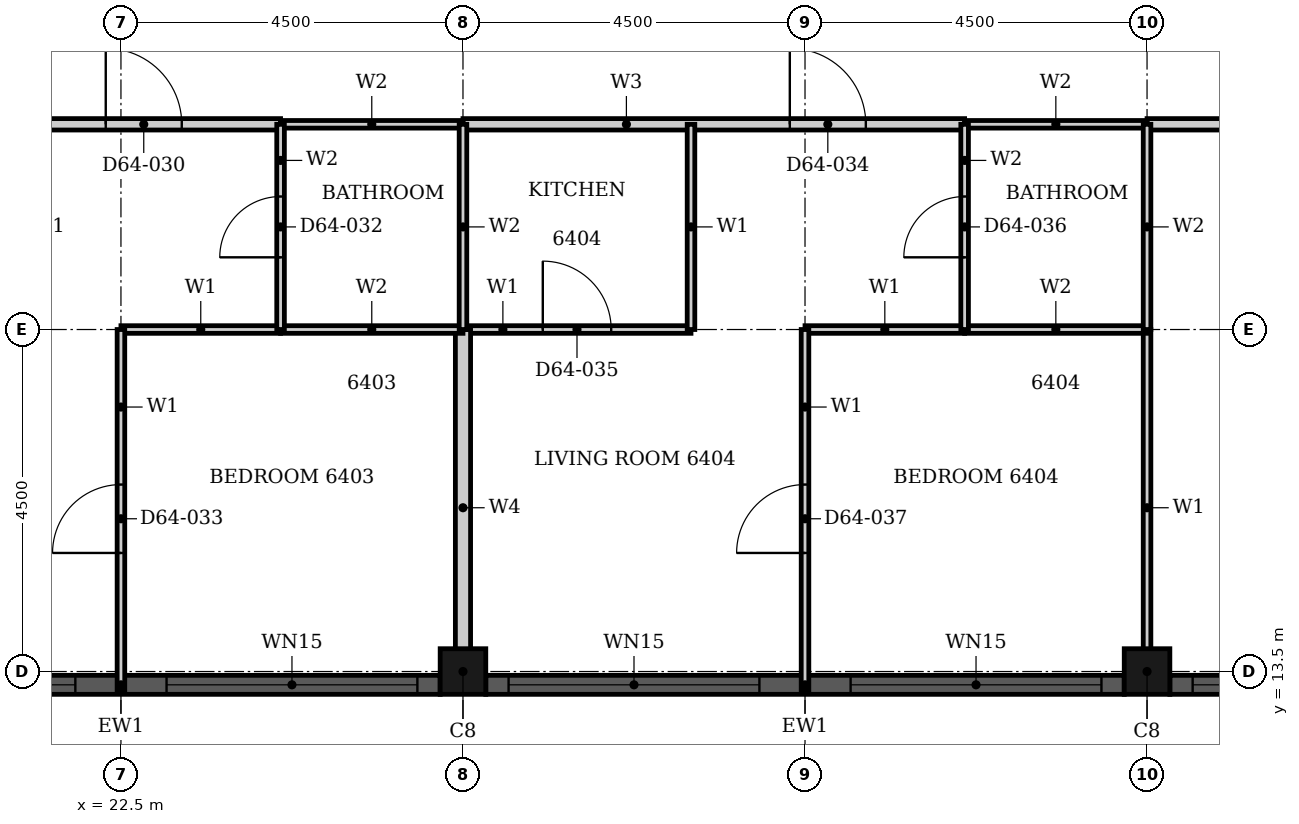
"""IFC4 building model, lengths in metres.
Left out: names, types, materials, properties, quantities, classifications, styles, units other than length and angle.
Written with IfcOpenShell. Run it as: python <this file> out.ifc"""

import sys

from ifc_helpers import new_model, si_unit, direction, frame, frame_2d, origin, origin_2d, place, context, subcontext, project, spatial, rectangle, hollow_rectangle, extrude, element, fill, save


model = new_model("IFC4")
c1 = context("Model", 3, precision=1e-05, world=origin(), true_north=direction((0.0, 1.0)))
c2 = subcontext(c1, "Body", "Model", "MODEL_VIEW")
j1 = project(units=[si_unit("LENGTHUNIT", "METRE"), si_unit("PLANEANGLEUNIT", "RADIAN")], contexts=[c1])
p1 = place(None, origin())
s1 = spatial("IfcSite", under=j1, at=p1, CompositionType="ELEMENT")
p2 = place(p1, origin())
s2 = spatial("IfcBuilding", under=s1, at=p2, CompositionType="ELEMENT")
p3 = place(p2, frame((0.0, 0.0, 252.7)))
s3 = spatial("IfcBuildingStorey", under=s2, at=p3, CompositionType="ELEMENT", Elevation=252.7)
for number, where, z_axis, x_axis in (
    (1, (27.0, 13.5, 0.0), (0.0, 0.0, 1.0), (1.0, 0.0, 0.0)),
    (2, (36.0, 13.5, 0.0), (0.0, 0.0, 1.0), (1.0, 0.0, 0.0)),
):
    element("IfcColumn", number, at=place(p3, frame(where, z_axis=z_axis, x_axis=x_axis)), inside=s3, PredefinedType="COLUMN", context=c2, shape_type="SweptSolid", body=[
        extrude(hollow_rectangle(XDim=0.6, YDim=0.6, WallThickness=0.02, at=origin_2d()), origin(), (0.0, 0.0, 1.0), 3.7),
    ])
p4 = place(p3, frame((18.3, 13.325, 0.0), z_axis=(0.0, 0.0, 1.0), x_axis=(1.0, 0.0, 0.0)))
e3 = element("IfcWall", 3, at=p4, inside=s3, PredefinedType="SOLIDWALL", context=c2, shape_type="SweptSolid", body=[
    extrude(rectangle(XDim=8.4, YDim=0.25, at=frame_2d((4.2, 0.0))), origin(), (0.0, 0.0, 1.0), 3.7),
])
p5 = place(p4, frame((0.3, 0.0, 0.45)))
e4 = element("IfcOpeningElement", 4, at=p5, cuts=e3, PredefinedType="OPENING", context=c2, shape_type="SweptSolid", body=[
    extrude(rectangle(XDim=3.3, YDim=2.3, at=frame_2d((1.65, 1.15))), frame((0.0, 0.135, 0.0), z_axis=(0.0, -1.0, 0.0), x_axis=(1.0, 0.0, 0.0)), (0.0, 0.0, 1.0), 0.27),
])
p6 = place(p4, frame((4.8, 0.0, 0.45)))
e5 = element("IfcOpeningElement", 5, at=p6, cuts=e3, PredefinedType="OPENING", context=c2, shape_type="SweptSolid", body=[
    extrude(rectangle(XDim=3.3, YDim=2.3, at=frame_2d((1.65, 1.15))), frame((0.0, 0.135, 0.0), z_axis=(0.0, -1.0, 0.0), x_axis=(1.0, 0.0, 0.0)), (0.0, 0.0, 1.0), 0.27),
])
p7 = place(p3, frame((27.3, 13.325, 0.0), z_axis=(0.0, 0.0, 1.0), x_axis=(1.0, 0.0, 0.0)))
e6 = element("IfcWall", 6, at=p7, inside=s3, PredefinedType="SOLIDWALL", context=c2, shape_type="SweptSolid", body=[
    extrude(rectangle(XDim=8.4, YDim=0.25, at=frame_2d((4.2, 0.0))), origin(), (0.0, 0.0, 1.0), 3.7),
])
p8 = place(p7, frame((0.3, 0.0, 0.45)))
e7 = element("IfcOpeningElement", 7, at=p8, cuts=e6, PredefinedType="OPENING", context=c2, shape_type="SweptSolid", body=[
    extrude(rectangle(XDim=3.3, YDim=2.3, at=frame_2d((1.65, 1.15))), frame((0.0, 0.135, 0.0), z_axis=(0.0, -1.0, 0.0), x_axis=(1.0, 0.0, 0.0)), (0.0, 0.0, 1.0), 0.27),
])
p9 = place(p7, frame((4.8, 0.0, 0.45)))
e8 = element("IfcOpeningElement", 8, at=p9, cuts=e6, PredefinedType="OPENING", context=c2, shape_type="SweptSolid", body=[
    extrude(rectangle(XDim=3.3, YDim=2.3, at=frame_2d((1.65, 1.15))), frame((0.0, 0.135, 0.0), z_axis=(0.0, -1.0, 0.0), x_axis=(1.0, 0.0, 0.0)), (0.0, 0.0, 1.0), 0.27),
])
p10 = place(p3, frame((36.3, 13.325, 0.0), z_axis=(0.0, 0.0, 1.0), x_axis=(1.0, 0.0, 0.0)))
e9 = element("IfcWall", 9, at=p10, inside=s3, PredefinedType="SOLIDWALL", context=c2, shape_type="SweptSolid", body=[
    extrude(rectangle(XDim=8.4, YDim=0.25, at=frame_2d((4.2, 0.0))), origin(), (0.0, 0.0, 1.0), 3.7),
])
p11 = place(p10, frame((0.3, 0.0, 0.45)))
e10 = element("IfcOpeningElement", 10, at=p11, cuts=e9, PredefinedType="OPENING", context=c2, shape_type="SweptSolid", body=[
    extrude(rectangle(XDim=3.3, YDim=2.3, at=frame_2d((1.65, 1.15))), frame((0.0, 0.135, 0.0), z_axis=(0.0, -1.0, 0.0), x_axis=(1.0, 0.0, 0.0)), (0.0, 0.0, 1.0), 0.27),
])
p12 = place(p10, frame((4.8, 0.0, 0.45)))
e11 = element("IfcOpeningElement", 11, at=p12, cuts=e9, PredefinedType="OPENING", context=c2, shape_type="SweptSolid", body=[
    extrude(rectangle(XDim=3.3, YDim=2.3, at=frame_2d((1.65, 1.15))), frame((0.0, 0.135, 0.0), z_axis=(0.0, -1.0, 0.0), x_axis=(1.0, 0.0, 0.0)), (0.0, 0.0, 1.0), 0.27),
])
p13 = place(p3, frame((18.0, 20.7, 0.0), z_axis=(0.0, 0.0, 1.0), x_axis=(1.0, 0.0, 0.0)))
e12 = element("IfcWall", 12, at=p13, inside=s3, PredefinedType="PARTITIONING", context=c2, shape_type="SweptSolid", body=[
    extrude(rectangle(XDim=6.6, YDim=0.15, at=frame_2d((3.3, 0.0))), origin(), (0.0, 0.0, 1.0), 3.4),
])
p14 = place(p13, frame((4.3, 0.0, 0.0)))
e13 = element("IfcOpeningElement", 13, at=p14, cuts=e12, PredefinedType="OPENING", context=c2, shape_type="SweptSolid", body=[
    extrude(rectangle(XDim=1.0, YDim=2.2, at=frame_2d((0.5, 1.1))), frame((0.0, 0.085, 0.0), z_axis=(0.0, -1.0, 0.0), x_axis=(1.0, 0.0, 0.0)), (0.0, 0.0, 1.0), 0.17),
])
p15 = place(p3, frame((27.0, 20.7, 0.0), z_axis=(0.0, 0.0, 1.0), x_axis=(1.0, 0.0, 0.0)))
e14 = element("IfcWall", 14, at=p15, inside=s3, PredefinedType="PARTITIONING", context=c2, shape_type="SweptSolid", body=[
    extrude(rectangle(XDim=6.6, YDim=0.15, at=frame_2d((3.3, 0.0))), origin(), (0.0, 0.0, 1.0), 3.4),
])
p16 = place(p15, frame((4.3, 0.0, 0.0)))
e15 = element("IfcOpeningElement", 15, at=p16, cuts=e14, PredefinedType="OPENING", context=c2, shape_type="SweptSolid", body=[
    extrude(rectangle(XDim=1.0, YDim=2.2, at=frame_2d((0.5, 1.1))), frame((0.0, 0.085, 0.0), z_axis=(0.0, -1.0, 0.0), x_axis=(1.0, 0.0, 0.0)), (0.0, 0.0, 1.0), 0.17),
])
p17 = place(p3, frame((36.0, 20.7, 0.0), z_axis=(0.0, 0.0, 1.0), x_axis=(1.0, 0.0, 0.0)))
e16 = element("IfcWall", 16, at=p17, inside=s3, PredefinedType="PARTITIONING", context=c2, shape_type="SweptSolid", body=[
    extrude(rectangle(XDim=13.55, YDim=0.15, at=frame_2d((6.775, 0.0))), origin(), (0.0, 0.0, 1.0), 3.4),
])
p18 = place(p17, frame((4.0, 0.0, 0.0)))
e17 = element("IfcOpeningElement", 17, at=p18, cuts=e16, PredefinedType="OPENING", context=c2, shape_type="SweptSolid", body=[
    extrude(rectangle(XDim=1.0, YDim=2.1, at=frame_2d((0.5, 1.05))), frame((0.0, 0.085, 0.0), z_axis=(0.0, -1.0, 0.0), x_axis=(1.0, 0.0, 0.0)), (0.0, 0.0, 1.0), 0.17),
])
for number, where, z_axis, x_axis in (
    (18, (22.5, 18.0, 0.0), (0.0, 0.0, 1.0), (1.0, 0.0, 0.0)),
    (19, (31.5, 18.0, 0.0), (0.0, 0.0, 1.0), (1.0, 0.0, 0.0)),
):
    element("IfcWall", number, at=place(p3, frame(where, z_axis=z_axis, x_axis=x_axis)), inside=s3, PredefinedType="PARTITIONING", context=c2, shape_type="SweptSolid", body=[
        extrude(rectangle(XDim=2.1, YDim=0.1, at=frame_2d((1.05, 0.0))), origin(), (0.0, 0.0, 1.0), 3.4),
    ])
p19 = place(p3, frame((27.0, 18.0, 0.0), z_axis=(0.0, 0.0, 1.0), x_axis=(1.0, 0.0, 0.0)))
e20 = element("IfcWall", 20, at=p19, inside=s3, PredefinedType="PARTITIONING", context=c2, shape_type="SweptSolid", body=[
    extrude(rectangle(XDim=3.0, YDim=0.1, at=frame_2d((1.5, 0.0))), origin(), (0.0, 0.0, 1.0), 3.4),
])
p20 = place(p19, frame((1.05, 0.0, 0.0)))
e21 = element("IfcOpeningElement", 21, at=p20, cuts=e20, PredefinedType="OPENING", context=c2, shape_type="SweptSolid", body=[
    extrude(rectangle(XDim=0.9, YDim=2.1, at=frame_2d((0.45, 1.05))), frame((0.0, 0.06, 0.0), z_axis=(0.0, -1.0, 0.0), x_axis=(1.0, 0.0, 0.0)), (0.0, 0.0, 1.0), 0.12),
])
p21 = place(p3, frame((22.5, 13.26, 0.0), z_axis=(0.0, 0.0, 1.0), x_axis=(0.0, 1.0, 0.0)))
e22 = element("IfcWall", 22, at=p21, inside=s3, PredefinedType="PARTITIONING", context=c2, shape_type="SweptSolid", body=[
    extrude(rectangle(XDim=4.74, YDim=0.1, at=frame_2d((2.37, 0.0))), origin(), (0.0, 0.0, 1.0), 3.4),
])
p22 = place(p21, frame((1.8, 0.0, 0.0)))
e23 = element("IfcOpeningElement", 23, at=p22, cuts=e22, PredefinedType="OPENING", context=c2, shape_type="SweptSolid", body=[
    extrude(rectangle(XDim=0.9, YDim=2.1, at=frame_2d((0.45, 1.05))), frame((0.0, 0.06, 0.0), z_axis=(0.0, -1.0, 0.0), x_axis=(1.0, 0.0, 0.0)), (0.0, 0.0, 1.0), 0.12),
])
p23 = place(p3, frame((30.0, 18.0, 0.0), z_axis=(0.0, 0.0, 1.0), x_axis=(0.0, 1.0, 0.0)))
e24 = element("IfcWall", 24, at=p23, inside=s3, PredefinedType="PARTITIONING", context=c2, shape_type="SweptSolid", body=[
    extrude(rectangle(XDim=2.7, YDim=0.1, at=frame_2d((1.35, 0.0))), origin(), (0.0, 0.0, 1.0), 3.4),
])
p24 = place(p3, frame((31.5, 13.26, 0.0), z_axis=(0.0, 0.0, 1.0), x_axis=(0.0, 1.0, 0.0)))
e25 = element("IfcWall", 25, at=p24, inside=s3, PredefinedType="PARTITIONING", context=c2, shape_type="SweptSolid", body=[
    extrude(rectangle(XDim=4.74, YDim=0.1, at=frame_2d((2.37, 0.0))), origin(), (0.0, 0.0, 1.0), 3.4),
])
p25 = place(p24, frame((1.8, 0.0, 0.0)))
e26 = element("IfcOpeningElement", 26, at=p25, cuts=e25, PredefinedType="OPENING", context=c2, shape_type="SweptSolid", body=[
    extrude(rectangle(XDim=0.9, YDim=2.1, at=frame_2d((0.45, 1.05))), frame((0.0, 0.06, 0.0), z_axis=(0.0, -1.0, 0.0), x_axis=(1.0, 0.0, 0.0)), (0.0, 0.0, 1.0), 0.12),
])
p26 = place(p3, frame((36.0, 13.31, 0.0), z_axis=(0.0, 0.0, 1.0), x_axis=(0.0, 1.0, 0.0)))
e27 = element("IfcWall", 27, at=p26, inside=s3, PredefinedType="PARTITIONING", context=c2, shape_type="SweptSolid", body=[
    extrude(rectangle(XDim=4.69, YDim=0.1, at=frame_2d((2.345, 0.0))), origin(), (0.0, 0.0, 1.0), 3.4),
])
p27 = place(p3, frame((27.0, 13.31, 0.0), z_axis=(0.0, 0.0, 1.0), x_axis=(0.0, 1.0, 0.0)))
e28 = element("IfcWall", 28, at=p27, inside=s3, PredefinedType="PARTITIONING", context=c2, shape_type="SweptSolid", body=[
    extrude(rectangle(XDim=4.69, YDim=0.2, at=frame_2d((2.345, 0.0))), origin(), (0.0, 0.0, 1.0), 3.4),
])
for number, where, z_axis, x_axis in (
    (29, (24.6, 18.0, 0.0), (0.0, 0.0, 1.0), (1.0, 0.0, 0.0)),
    (30, (33.6, 18.0, 0.0), (0.0, 0.0, 1.0), (1.0, 0.0, 0.0)),
    (31, (24.6, 20.7, 0.0), (0.0, 0.0, 1.0), (1.0, 0.0, 0.0)),
    (32, (33.6, 20.7, 0.0), (0.0, 0.0, 1.0), (1.0, 0.0, 0.0)),
):
    element("IfcWall", number, at=place(p3, frame(where, z_axis=z_axis, x_axis=x_axis)), inside=s3, PredefinedType="PARTITIONING", context=c2, shape_type="SweptSolid", body=[
        extrude(rectangle(XDim=2.4, YDim=0.1, at=frame_2d((1.2, 0.0))), origin(), (0.0, 0.0, 1.0), 3.4),
    ])
p28 = place(p3, frame((24.6, 18.0, 0.0), z_axis=(0.0, 0.0, 1.0), x_axis=(0.0, 1.0, 0.0)))
e33 = element("IfcWall", 33, at=p28, inside=s3, PredefinedType="PARTITIONING", context=c2, shape_type="SweptSolid", body=[
    extrude(rectangle(XDim=2.7, YDim=0.1, at=frame_2d((1.35, 0.0))), origin(), (0.0, 0.0, 1.0), 3.4),
])
p29 = place(p28, frame((0.95, 0.0, 0.0)))
e34 = element("IfcOpeningElement", 34, at=p29, cuts=e33, PredefinedType="OPENING", context=c2, shape_type="SweptSolid", body=[
    extrude(rectangle(XDim=0.8, YDim=2.1, at=frame_2d((0.4, 1.05))), frame((0.0, 0.06, 0.0), z_axis=(0.0, -1.0, 0.0), x_axis=(1.0, 0.0, 0.0)), (0.0, 0.0, 1.0), 0.12),
])
p30 = place(p3, frame((27.0, 18.0, 0.0), z_axis=(0.0, 0.0, 1.0), x_axis=(0.0, 1.0, 0.0)))
e35 = element("IfcWall", 35, at=p30, inside=s3, PredefinedType="PARTITIONING", context=c2, shape_type="SweptSolid", body=[
    extrude(rectangle(XDim=2.7, YDim=0.1, at=frame_2d((1.35, 0.0))), origin(), (0.0, 0.0, 1.0), 3.4),
])
p31 = place(p3, frame((33.6, 18.0, 0.0), z_axis=(0.0, 0.0, 1.0), x_axis=(0.0, 1.0, 0.0)))
e36 = element("IfcWall", 36, at=p31, inside=s3, PredefinedType="PARTITIONING", context=c2, shape_type="SweptSolid", body=[
    extrude(rectangle(XDim=2.7, YDim=0.1, at=frame_2d((1.35, 0.0))), origin(), (0.0, 0.0, 1.0), 3.4),
])
p32 = place(p31, frame((0.95, 0.0, 0.0)))
e37 = element("IfcOpeningElement", 37, at=p32, cuts=e36, PredefinedType="OPENING", context=c2, shape_type="SweptSolid", body=[
    extrude(rectangle(XDim=0.8, YDim=2.1, at=frame_2d((0.4, 1.05))), frame((0.0, 0.06, 0.0), z_axis=(0.0, -1.0, 0.0), x_axis=(1.0, 0.0, 0.0)), (0.0, 0.0, 1.0), 0.12),
])
p33 = place(p3, frame((36.0, 18.0, 0.0), z_axis=(0.0, 0.0, 1.0), x_axis=(0.0, 1.0, 0.0)))
e38 = element("IfcWall", 38, at=p33, inside=s3, PredefinedType="PARTITIONING", context=c2, shape_type="SweptSolid", body=[
    extrude(rectangle(XDim=2.7, YDim=0.1, at=frame_2d((1.35, 0.0))), origin(), (0.0, 0.0, 1.0), 3.4),
])
p34 = place(p5, origin())
e39 = element("IfcWindow", 39, at=p34, inside=s3, PartitioningType="SINGLE_PANEL", PredefinedType="WINDOW", context=c2, shape_type="SweptSolid", body=[
    extrude(rectangle(XDim=3.3, YDim=2.3, at=frame_2d((1.65, 1.15))), frame((0.0, 0.03, 0.0), z_axis=(0.0, -1.0, 0.0), x_axis=(1.0, 0.0, 0.0)), (0.0, 0.0, 1.0), 0.06),
])
fill(e4, e39)
p35 = place(p6, origin())
e40 = element("IfcWindow", 40, at=p35, inside=s3, PartitioningType="SINGLE_PANEL", PredefinedType="WINDOW", context=c2, shape_type="SweptSolid", body=[
    extrude(rectangle(XDim=3.3, YDim=2.3, at=frame_2d((1.65, 1.15))), frame((0.0, 0.03, 0.0), z_axis=(0.0, -1.0, 0.0), x_axis=(1.0, 0.0, 0.0)), (0.0, 0.0, 1.0), 0.06),
])
fill(e5, e40)
p36 = place(p8, origin())
e41 = element("IfcWindow", 41, at=p36, inside=s3, PartitioningType="SINGLE_PANEL", PredefinedType="WINDOW", context=c2, shape_type="SweptSolid", body=[
    extrude(rectangle(XDim=3.3, YDim=2.3, at=frame_2d((1.65, 1.15))), frame((0.0, 0.03, 0.0), z_axis=(0.0, -1.0, 0.0), x_axis=(1.0, 0.0, 0.0)), (0.0, 0.0, 1.0), 0.06),
])
fill(e7, e41)
p37 = place(p9, origin())
e42 = element("IfcWindow", 42, at=p37, inside=s3, PartitioningType="SINGLE_PANEL", PredefinedType="WINDOW", context=c2, shape_type="SweptSolid", body=[
    extrude(rectangle(XDim=3.3, YDim=2.3, at=frame_2d((1.65, 1.15))), frame((0.0, 0.03, 0.0), z_axis=(0.0, -1.0, 0.0), x_axis=(1.0, 0.0, 0.0)), (0.0, 0.0, 1.0), 0.06),
])
fill(e8, e42)
p38 = place(p11, origin())
e43 = element("IfcWindow", 43, at=p38, inside=s3, PartitioningType="SINGLE_PANEL", PredefinedType="WINDOW", context=c2, shape_type="SweptSolid", body=[
    extrude(rectangle(XDim=3.3, YDim=2.3, at=frame_2d((1.65, 1.15))), frame((0.0, 0.03, 0.0), z_axis=(0.0, -1.0, 0.0), x_axis=(1.0, 0.0, 0.0)), (0.0, 0.0, 1.0), 0.06),
])
fill(e10, e43)
p39 = place(p14, origin())
e44 = element("IfcDoor", 44, at=p39, inside=s3, OperationType="SINGLE_SWING_RIGHT", PredefinedType="DOOR", context=c2, shape_type="SweptSolid", body=[
    extrude(rectangle(XDim=1.0, YDim=2.2, at=frame_2d((0.5, 1.1))), frame((0.0, 0.025, 0.0), z_axis=(0.0, -1.0, 0.0), x_axis=(1.0, 0.0, 0.0)), (0.0, 0.0, 1.0), 0.05),
])
fill(e13, e44)
p40 = place(p29, origin())
e45 = element("IfcDoor", 45, at=p40, inside=s3, OperationType="SINGLE_SWING_LEFT", PredefinedType="DOOR", context=c2, shape_type="SweptSolid", body=[
    extrude(rectangle(XDim=0.8, YDim=2.1, at=frame_2d((0.4, 1.05))), frame((0.0, 0.025, 0.0), z_axis=(0.0, -1.0, 0.0), x_axis=(1.0, 0.0, 0.0)), (0.0, 0.0, 1.0), 0.05),
])
fill(e34, e45)
p41 = place(p22, origin())
e46 = element("IfcDoor", 46, at=p41, inside=s3, OperationType="SINGLE_SWING_LEFT", PredefinedType="DOOR", context=c2, shape_type="SweptSolid", body=[
    extrude(rectangle(XDim=0.9, YDim=2.1, at=frame_2d((0.45, 1.05))), frame((0.0, 0.025, 0.0), z_axis=(0.0, -1.0, 0.0), x_axis=(1.0, 0.0, 0.0)), (0.0, 0.0, 1.0), 0.05),
])
fill(e23, e46)
p42 = place(p16, origin())
e47 = element("IfcDoor", 47, at=p42, inside=s3, OperationType="SINGLE_SWING_RIGHT", PredefinedType="DOOR", context=c2, shape_type="SweptSolid", body=[
    extrude(rectangle(XDim=1.0, YDim=2.2, at=frame_2d((0.5, 1.1))), frame((0.0, 0.025, 0.0), z_axis=(0.0, -1.0, 0.0), x_axis=(1.0, 0.0, 0.0)), (0.0, 0.0, 1.0), 0.05),
])
fill(e15, e47)
p43 = place(p20, origin())
e48 = element("IfcDoor", 48, at=p43, inside=s3, OperationType="SINGLE_SWING_RIGHT", PredefinedType="DOOR", context=c2, shape_type="SweptSolid", body=[
    extrude(rectangle(XDim=0.9, YDim=2.1, at=frame_2d((0.45, 1.05))), frame((0.0, 0.025, 0.0), z_axis=(0.0, -1.0, 0.0), x_axis=(1.0, 0.0, 0.0)), (0.0, 0.0, 1.0), 0.05),
])
fill(e21, e48)
p44 = place(p32, origin())
e49 = element("IfcDoor", 49, at=p44, inside=s3, OperationType="SINGLE_SWING_LEFT", PredefinedType="DOOR", context=c2, shape_type="SweptSolid", body=[
    extrude(rectangle(XDim=0.8, YDim=2.1, at=frame_2d((0.4, 1.05))), frame((0.0, 0.025, 0.0), z_axis=(0.0, -1.0, 0.0), x_axis=(1.0, 0.0, 0.0)), (0.0, 0.0, 1.0), 0.05),
])
fill(e37, e49)
p45 = place(p25, origin())
e50 = element("IfcDoor", 50, at=p45, inside=s3, OperationType="SINGLE_SWING_RIGHT", PredefinedType="DOOR", context=c2, shape_type="SweptSolid", body=[
    extrude(rectangle(XDim=0.9, YDim=2.1, at=frame_2d((0.45, 1.05))), frame((0.0, 0.025, 0.0), z_axis=(0.0, -1.0, 0.0), x_axis=(1.0, 0.0, 0.0)), (0.0, 0.0, 1.0), 0.05),
])
fill(e26, e50)
save(model, sys.argv[1])
